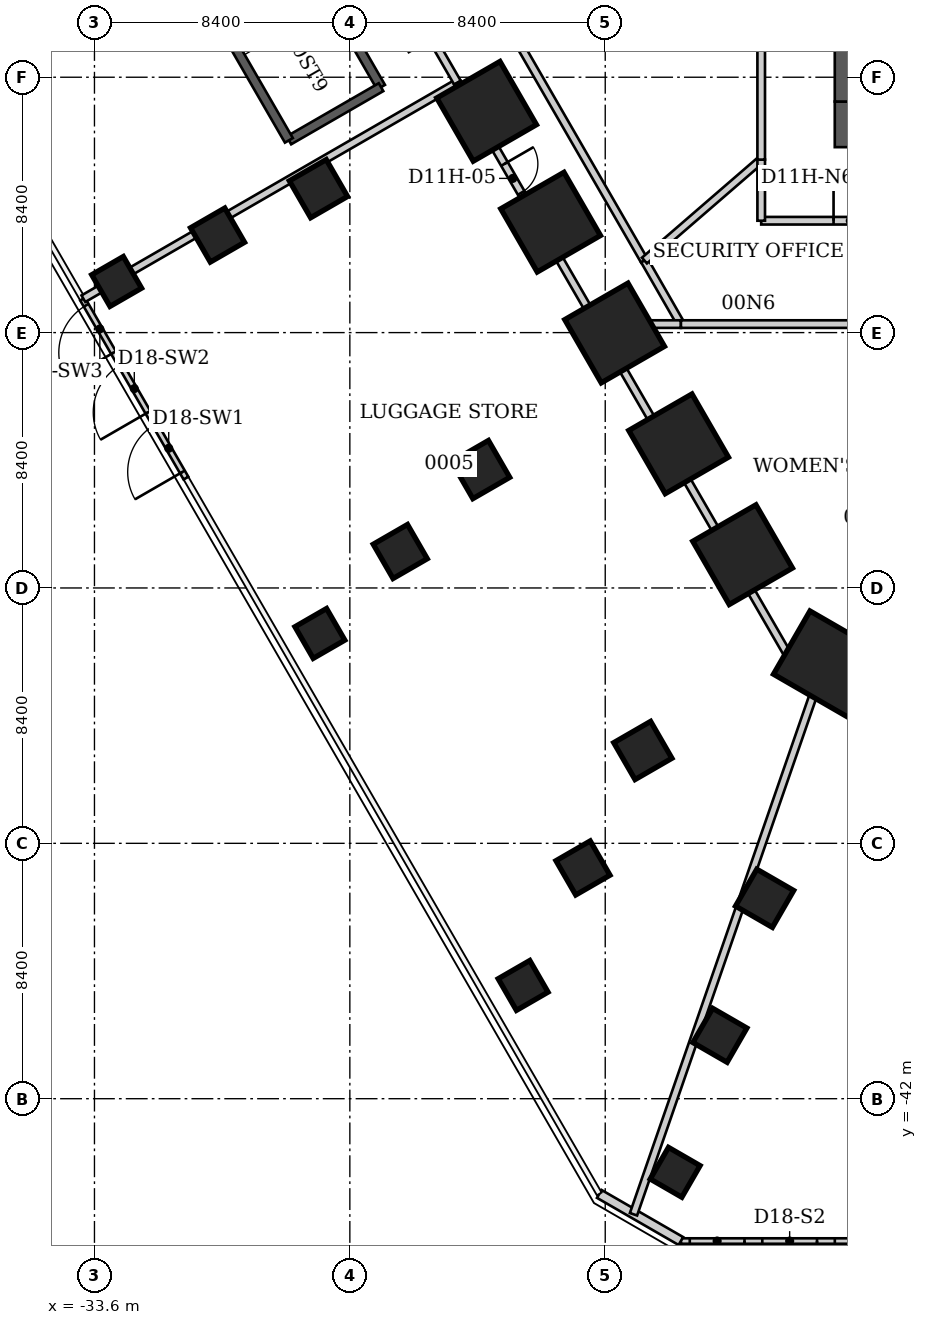
"""IFC4 building model, lengths in metres.
Left out: names, types, materials, properties, quantities, classifications, styles, units other than length and angle.
Written with IfcOpenShell. Run it as: python <this file> out.ifc"""

import sys

from ifc_helpers import new_model, si_unit, direction, frame, frame_2d, origin, origin_2d, place, context, subcontext, project, spatial, rectangle, extrude, element, fill, save


model = new_model("IFC4")
c1 = context("Model", 3, precision=1e-05, world=origin(), true_north=direction((0.0, 1.0)))
c2 = subcontext(c1, "Body", "Model", "MODEL_VIEW")
j1 = project(units=[si_unit("LENGTHUNIT", "METRE"), si_unit("PLANEANGLEUNIT", "RADIAN")], contexts=[c1])
p1 = place(None, origin())
s1 = spatial("IfcSite", under=j1, at=p1, CompositionType="ELEMENT")
p2 = place(p1, origin())
s2 = spatial("IfcBuilding", under=s1, at=p2, CompositionType="ELEMENT")
p3 = place(p2, origin())
s3 = spatial("IfcBuildingStorey", under=s2, at=p3, CompositionType="ELEMENT", Elevation=0.0)
p4 = place(p3, frame((-9.106, -27.897, -0.2), z_axis=(0.0, 0.0, 1.0), x_axis=(-0.5, -0.866025403784, 0.0)))
e1 = element("IfcColumn", 1, at=p4, inside=s3, PredefinedType="COLUMN", context=c2, shape_type="SweptSolid", body=[
    extrude(rectangle(XDim=2.4, YDim=3.6, at=origin_2d()), origin(), (0.0, 0.0, 1.0), 6.2),
])
for number, where, z_axis, x_axis in (
    (2, (-12.282, -24.105, -0.2), (0.0, 0.0, 1.0), (-0.866, -0.5, 0.0)),
    (3, (-14.387, -20.459, -0.2), (0.0, 0.0, 1.0), (-0.866, -0.5, 0.0)),
    (4, (-16.491, -16.813, -0.2), (0.0, 0.0, 1.0), (-0.866, -0.5, 0.0)),
    (5, (-18.596, -13.167, -0.2), (0.0, 0.0, 1.0), (-0.866, -0.5, 0.0)),
    (6, (-20.701, -9.521, -0.2), (0.0, 0.0, 1.0), (-0.866, -0.5, 0.0)),
):
    element("IfcColumn", number, at=place(p3, frame(where, z_axis=z_axis, x_axis=x_axis)), inside=s3, PredefinedType="COLUMN", context=c2, shape_type="SweptSolid", body=[
        extrude(rectangle(XDim=2.4, YDim=2.4, at=origin_2d()), origin(), (0.0, 0.0, 1.0), 6.2),
    ])
for number, where, z_axis, x_axis in (
    (7, (-11.558, -35.408, -0.2), (0.0, 0.0, 1.0), (-0.5, -0.866, 0.0)),
    (8, (-15.563, -30.546, -0.2), (0.0, 0.0, 1.0), (-0.866, -0.5, 0.0)),
    (9, (-20.898, -21.305, -0.2), (0.0, 0.0, 1.0), (-0.866, -0.5, 0.0)),
    (10, (-26.233, -12.065, -0.2), (0.0, 0.0, 1.0), (-0.866, -0.5, 0.0)),
):
    element("IfcColumn", number, at=place(p3, frame(where, z_axis=z_axis, x_axis=x_axis)), inside=s3, PredefinedType="COLUMN", context=c2, shape_type="SweptSolid", body=[
        extrude(rectangle(XDim=1.4, YDim=1.4, at=origin_2d()), origin(), (0.0, 0.0, 1.0), 6.2),
    ])
for number, where, z_axis, x_axis in (
    (11, (-13.029, -39.915, -0.2), (0.0, 0.0, 1.0), (-0.5, -0.866, 0.0)),
    (12, (-17.532, -34.41, -0.2), (0.0, 0.0, 1.0), (-0.866, -0.5, 0.0)),
    (13, (-23.542, -24.001, -0.2), (0.0, 0.0, 1.0), (-0.866, -0.5, 0.0)),
    (14, (-29.552, -13.592, -0.2), (0.0, 0.0, 1.0), (-0.866, -0.5, 0.0)),
):
    element("IfcColumn", number, at=place(p3, frame(where, z_axis=z_axis, x_axis=x_axis)), inside=s3, PredefinedType="COLUMN", context=c2, shape_type="SweptSolid", body=[
        extrude(rectangle(XDim=1.3, YDim=1.3, at=origin_2d()), origin(), (0.0, 0.0, 1.0), 6.2),
    ])
for number, where, z_axis, x_axis in (
    (15, (-14.5, -44.421, -0.2), (0.0, 0.0, 1.0), (-0.5, -0.866, 0.0)),
    (16, (-19.501, -38.274, -0.2), (0.0, 0.0, 1.0), (-0.866, -0.5, 0.0)),
    (17, (-26.186, -26.696, -0.2), (0.0, 0.0, 1.0), (-0.866, -0.5, 0.0)),
    (18, (-32.87, -15.118, -0.2), (0.0, 0.0, 1.0), (-0.866, -0.5, 0.0)),
):
    element("IfcColumn", number, at=place(p3, frame(where, z_axis=z_axis, x_axis=x_axis)), inside=s3, PredefinedType="COLUMN", context=c2, shape_type="SweptSolid", body=[
        extrude(rectangle(XDim=1.2, YDim=1.2, at=origin_2d()), origin(), (0.0, 0.0, 1.0), 6.2),
    ])
p5 = place(p3, frame((-9.25, -9.95, -0.2), z_axis=(0.0, 0.0, 1.0), x_axis=(1.0, 0.0, 0.0)))
e19 = element("IfcWall", 19, at=p5, inside=s3, PredefinedType="SHEAR", context=c2, shape_type="SweptSolid", body=[
    extrude(rectangle(XDim=18.5, YDim=1.5, at=frame_2d((9.25, 0.0))), origin(), (0.0, 0.0, 1.0), 6.2),
])
p6 = place(p5, frame((2.137, 0.0, 0.2)))
e20 = element("IfcOpeningElement", 20, at=p6, cuts=e19, PredefinedType="OPENING", context=c2, shape_type="SweptSolid", body=[
    extrude(rectangle(XDim=1.1, YDim=2.1, at=frame_2d((0.55, 1.05))), frame((0.0, 0.75, 0.0), z_axis=(0.0, -1.0, 0.0), x_axis=(1.0, 0.0, 0.0)), (0.0, 0.0, 1.0), 1.5),
])
p7 = place(p5, frame((4.762, 0.0, 0.2)))
e21 = element("IfcOpeningElement", 21, at=p7, cuts=e19, PredefinedType="OPENING", context=c2, shape_type="SweptSolid", body=[
    extrude(rectangle(XDim=1.1, YDim=2.1, at=frame_2d((0.55, 1.05))), frame((0.0, 0.75, 0.0), z_axis=(0.0, -1.0, 0.0), x_axis=(1.0, 0.0, 0.0)), (0.0, 0.0, 1.0), 1.5),
])
p8 = place(p5, frame((7.387, 0.0, 0.2)))
e22 = element("IfcOpeningElement", 22, at=p8, cuts=e19, PredefinedType="OPENING", context=c2, shape_type="SweptSolid", body=[
    extrude(rectangle(XDim=1.1, YDim=2.1, at=frame_2d((0.55, 1.05))), frame((0.0, 0.75, 0.0), z_axis=(0.0, -1.0, 0.0), x_axis=(1.0, 0.0, 0.0)), (0.0, 0.0, 1.0), 1.5),
])
p9 = place(p5, frame((10.012, 0.0, 0.2)))
e23 = element("IfcOpeningElement", 23, at=p9, cuts=e19, PredefinedType="OPENING", context=c2, shape_type="SweptSolid", body=[
    extrude(rectangle(XDim=1.1, YDim=2.1, at=frame_2d((0.55, 1.05))), frame((0.0, 0.75, 0.0), z_axis=(0.0, -1.0, 0.0), x_axis=(1.0, 0.0, 0.0)), (0.0, 0.0, 1.0), 1.5),
])
p10 = place(p5, frame((12.637, 0.0, 0.2)))
e24 = element("IfcOpeningElement", 24, at=p10, cuts=e19, PredefinedType="OPENING", context=c2, shape_type="SweptSolid", body=[
    extrude(rectangle(XDim=1.1, YDim=2.1, at=frame_2d((0.55, 1.05))), frame((0.0, 0.75, 0.0), z_axis=(0.0, -1.0, 0.0), x_axis=(1.0, 0.0, 0.0)), (0.0, 0.0, 1.0), 1.5),
])
p11 = place(p5, frame((15.262, 0.0, 0.2)))
e25 = element("IfcOpeningElement", 25, at=p11, cuts=e19, PredefinedType="OPENING", context=c2, shape_type="SweptSolid", body=[
    extrude(rectangle(XDim=1.1, YDim=2.1, at=frame_2d((0.55, 1.05))), frame((0.0, 0.75, 0.0), z_axis=(0.0, -1.0, 0.0), x_axis=(1.0, 0.0, 0.0)), (0.0, 0.0, 1.0), 1.5),
])
p12 = place(p3, frame((-8.5, -9.2, -0.2), z_axis=(0.0, 0.0, 1.0), x_axis=(0.0, 1.0, 0.0)))
e26 = element("IfcWall", 26, at=p12, inside=s3, PredefinedType="SHEAR", context=c2, shape_type="SweptSolid", body=[
    extrude(rectangle(XDim=15.3, YDim=1.5, at=frame_2d((7.65, 0.0))), origin(), (0.0, 0.0, 1.0), 6.2),
])
p13 = place(p12, frame((10.7, 0.0, 0.2)))
e27 = element("IfcOpeningElement", 27, at=p13, cuts=e26, PredefinedType="OPENING", context=c2, shape_type="SweptSolid", body=[
    extrude(rectangle(XDim=1.2, YDim=2.2, at=frame_2d((0.6, 1.1))), frame((0.0, 0.75, 0.0), z_axis=(0.0, -1.0, 0.0), x_axis=(1.0, 0.0, 0.0)), (0.0, 0.0, 1.0), 1.5),
])
p14 = place(p3, frame((-7.156, -46.682, 0.0), z_axis=(0.0, 0.0, 1.0), x_axis=(-1.0, 0.0, 0.0)))
e28 = element("IfcWall", 28, at=p14, inside=s3, PredefinedType="SOLIDWALL", context=c2, shape_type="SweptSolid", body=[
    extrude(rectangle(XDim=7.156, YDim=0.18, at=frame_2d((3.578, 0.0))), origin(), (0.0, 0.0, 1.0), 5.84),
])
p15 = place(p14, frame((0.293, 0.0, 0.0)))
e29 = element("IfcOpeningElement", 29, at=p15, cuts=e28, PredefinedType="OPENING", context=c2, shape_type="SweptSolid", body=[
    extrude(rectangle(XDim=1.8, YDim=2.7, at=frame_2d((0.9, 1.35))), frame((0.0, 0.09, 0.0), z_axis=(0.0, -1.0, 0.0), x_axis=(1.0, 0.0, 0.0)), (0.0, 0.0, 1.0), 0.18),
])
p16 = place(p14, frame((2.678, 0.0, 0.0)))
e30 = element("IfcOpeningElement", 30, at=p16, cuts=e28, PredefinedType="OPENING", context=c2, shape_type="SweptSolid", body=[
    extrude(rectangle(XDim=1.8, YDim=2.7, at=frame_2d((0.9, 1.35))), frame((0.0, 0.09, 0.0), z_axis=(0.0, -1.0, 0.0), x_axis=(1.0, 0.0, 0.0)), (0.0, 0.0, 1.0), 0.18),
])
p17 = place(p14, frame((5.063, 0.0, 0.0)))
e31 = element("IfcOpeningElement", 31, at=p17, cuts=e28, PredefinedType="OPENING", context=c2, shape_type="SweptSolid", body=[
    extrude(rectangle(XDim=1.8, YDim=2.7, at=frame_2d((0.9, 1.35))), frame((0.0, 0.09, 0.0), z_axis=(0.0, -1.0, 0.0), x_axis=(1.0, 0.0, 0.0)), (0.0, 0.0, 1.0), 0.18),
])
p18 = place(p3, frame((-14.312, -46.682, 0.0), z_axis=(0.0, 0.0, 1.0), x_axis=(-0.86600983753, 0.500026960575, 0.0)))
e32 = element("IfcWall", 32, at=p18, inside=s3, PredefinedType="SOLIDWALL", context=c2, shape_type="SweptSolid", body=[
    extrude(rectangle(XDim=3.1, YDim=0.3, at=frame_2d((1.55, 0.0))), origin(), (0.0, 0.0, 1.0), 5.84),
])
p19 = place(p3, frame((-30.591, -21.586, 0.0), z_axis=(0.0, 0.0, 1.0), x_axis=(-0.500013675503, 0.866017508085, 0.0)))
e33 = element("IfcWall", 33, at=p19, inside=s3, PredefinedType="SOLIDWALL", context=c2, shape_type="SweptSolid", body=[
    extrude(rectangle(XDim=6.797, YDim=0.18, at=frame_2d((3.398, 0.0))), origin(), (0.0, 0.0, 1.0), 5.84),
])
p20 = place(p19, frame((0.233, 0.0, 0.0)))
e34 = element("IfcOpeningElement", 34, at=p20, cuts=e33, PredefinedType="OPENING", context=c2, shape_type="SweptSolid", body=[
    extrude(rectangle(XDim=1.8, YDim=2.7, at=frame_2d((0.9, 1.35))), frame((0.0, 0.09, 0.0), z_axis=(0.0, -1.0, 0.0), x_axis=(1.0, 0.0, 0.0)), (0.0, 0.0, 1.0), 0.18),
])
p21 = place(p19, frame((2.499, 0.0, 0.0)))
e35 = element("IfcOpeningElement", 35, at=p21, cuts=e33, PredefinedType="OPENING", context=c2, shape_type="SweptSolid", body=[
    extrude(rectangle(XDim=1.8, YDim=2.7, at=frame_2d((0.9, 1.35))), frame((0.0, 0.09, 0.0), z_axis=(0.0, -1.0, 0.0), x_axis=(1.0, 0.0, 0.0)), (0.0, 0.0, 1.0), 0.18),
])
p22 = place(p19, frame((4.764, 0.0, 0.0)))
e36 = element("IfcOpeningElement", 36, at=p22, cuts=e33, PredefinedType="OPENING", context=c2, shape_type="SweptSolid", body=[
    extrude(rectangle(XDim=1.8, YDim=2.7, at=frame_2d((0.9, 1.35))), frame((0.0, 0.09, 0.0), z_axis=(0.0, -1.0, 0.0), x_axis=(1.0, 0.0, 0.0)), (0.0, 0.0, 1.0), 0.18),
])
p23 = place(p3, frame((-33.964, -15.685, 0.0), z_axis=(0.0, 0.0, 1.0), x_axis=(0.865990423019, 0.500060583569, 0.0)))
e37 = element("IfcWall", 37, at=p23, inside=s3, PredefinedType="PARTITIONING", context=c2, shape_type="SweptSolid", body=[
    extrude(rectangle(XDim=14.208, YDim=0.25, at=frame_2d((7.104, 0.0))), origin(), (0.0, 0.0, 1.0), 4.993),
])
p24 = place(p3, frame((-29.54, 5.06, 0.0), z_axis=(0.0, 0.0, 1.0), x_axis=(0.500237574973, -0.865888196354, 0.0)))
e38 = element("IfcWall", 38, at=p24, inside=s3, PredefinedType="PARTITIONING", context=c2, shape_type="SweptSolid", body=[
    extrude(rectangle(XDim=15.753, YDim=0.25, at=frame_2d((7.876, 0.0))), origin(), (0.0, 0.0, 1.0), 4.04),
])
p25 = place(p24, frame((5.726, 0.0, 0.0)))
e39 = element("IfcOpeningElement", 39, at=p25, cuts=e38, PredefinedType="OPENING", context=c2, shape_type="SweptSolid", body=[
    extrude(rectangle(XDim=1.6, YDim=2.4, at=frame_2d((0.8, 1.2))), frame((0.0, 0.125, 0.0), z_axis=(0.0, -1.0, 0.0), x_axis=(1.0, 0.0, 0.0)), (0.0, 0.0, 1.0), 0.25),
])
p26 = place(p3, frame((-27.14, 5.71, 0.0), z_axis=(0.0, 0.0, 1.0), x_axis=(0.499871788402, -0.866099414132, 0.0)))
e40 = element("IfcWall", 40, at=p26, inside=s3, PredefinedType="PARTITIONING", context=c2, shape_type="SweptSolid", body=[
    extrude(rectangle(XDim=23.257, YDim=0.25, at=frame_2d((11.628, 0.0))), origin(), (0.0, 0.0, 1.0), 5.84),
])
p27 = place(p26, frame((9.979, 0.0, 0.0)))
e41 = element("IfcOpeningElement", 41, at=p27, cuts=e40, PredefinedType="OPENING", context=c2, shape_type="SweptSolid", body=[
    extrude(rectangle(XDim=1.6, YDim=2.4, at=frame_2d((0.8, 1.2))), frame((0.0, 0.125, 0.0), z_axis=(0.0, -1.0, 0.0), x_axis=(1.0, 0.0, 0.0)), (0.0, 0.0, 1.0), 0.25),
])
p28 = place(p3, frame((-21.66, -8.58, 0.0), z_axis=(0.0, 0.0, 1.0), x_axis=(0.50046740921, -0.865755376719, 0.0)))
e42 = element("IfcWall", 42, at=p28, inside=s3, PredefinedType="PARTITIONING", context=c2, shape_type="SweptSolid", body=[
    extrude(rectangle(XDim=9.171, YDim=0.25, at=frame_2d((4.585, 0.0))), origin(), (0.0, 0.0, 1.0), 4.04),
])
p29 = place(p28, frame((3.086, 0.0, 0.0)))
e43 = element("IfcOpeningElement", 43, at=p29, cuts=e42, PredefinedType="OPENING", context=c2, shape_type="SweptSolid", body=[
    extrude(rectangle(XDim=1.1, YDim=2.2, at=frame_2d((0.55, 1.1))), frame((0.0, 0.125, 0.0), z_axis=(0.0, -1.0, 0.0), x_axis=(1.0, 0.0, 0.0)), (0.0, 0.0, 1.0), 0.25),
])
p30 = place(p3, frame((-17.08, -16.52, 0.0), z_axis=(0.0, 0.0, 1.0), x_axis=(0.500484795969, -0.865745325719, 0.0)))
e44 = element("IfcWall", 44, at=p30, inside=s3, PredefinedType="PARTITIONING", context=c2, shape_type="SweptSolid", body=[
    extrude(rectangle(XDim=13.387, YDim=0.25, at=frame_2d((6.694, 0.0))), origin(), (0.0, 0.0, 1.0), 4.04),
])
p31 = place(p3, frame((-15.87, -45.802, 0.0), z_axis=(0.0, 0.0, 1.0), x_axis=(0.327267371913, 0.944931779168, 0.0)))
e45 = element("IfcWall", 45, at=p31, inside=s3, PredefinedType="PARTITIONING", context=c2, shape_type="SweptSolid", body=[
    extrude(rectangle(XDim=18.395, YDim=0.25, at=frame_2d((9.197, 0.0))), origin(), (0.0, 0.0, 1.0), 5.75),
])
p32 = place(p3, frame((-15.51, -14.43, 0.0), z_axis=(0.0, 0.0, 1.0), x_axis=(0.497894326365, -0.867237706614, 0.0)))
e46 = element("IfcWall", 46, at=p32, inside=s3, PredefinedType="PARTITIONING", context=c2, shape_type="SweptSolid", body=[
    extrude(rectangle(XDim=2.41, YDim=0.25, at=frame_2d((1.205, 0.0))), origin(), (0.0, 0.0, 1.0), 5.84),
])
p33 = place(p3, frame((-14.31, -16.52, 0.0), z_axis=(0.0, 0.0, 1.0), x_axis=(-1.0, 0.0, 0.0)))
e47 = element("IfcWall", 47, at=p33, inside=s3, PredefinedType="PARTITIONING", context=c2, shape_type="SweptSolid", body=[
    extrude(rectangle(XDim=2.76, YDim=0.25, at=frame_2d((1.38, 0.0))), origin(), (0.0, 0.0, 1.0), 5.84),
])
p34 = place(p3, frame((-11.67, -13.12, 0.0), z_axis=(0.0, 0.0, 1.0), x_axis=(1.0, 0.0, 0.0)))
e48 = element("IfcWall", 48, at=p34, inside=s3, PredefinedType="PARTITIONING", context=c2, shape_type="SweptSolid", body=[
    extrude(rectangle(XDim=5.86, YDim=0.25, at=frame_2d((2.93, 0.0))), origin(), (0.0, 0.0, 1.0), 5.84),
])
p35 = place(p34, frame((2.38, 0.0, 0.0)))
e49 = element("IfcOpeningElement", 49, at=p35, cuts=e48, PredefinedType="OPENING", context=c2, shape_type="SweptSolid", body=[
    extrude(rectangle(XDim=1.1, YDim=2.2, at=frame_2d((0.55, 1.1))), frame((0.0, 0.125, 0.0), z_axis=(0.0, -1.0, 0.0), x_axis=(1.0, 0.0, 0.0)), (0.0, 0.0, 1.0), 0.25),
])
p36 = place(p3, frame((-11.67, -11.11, 0.0), z_axis=(0.0, 0.0, 1.0), x_axis=(-0.756493073491, -0.654001704707, 0.0)))
e50 = element("IfcWall", 50, at=p36, inside=s3, PredefinedType="PARTITIONING", context=c2, shape_type="SweptSolid", body=[
    extrude(rectangle(XDim=5.076, YDim=0.25, at=frame_2d((2.538, 0.0))), origin(), (0.0, 0.0, 1.0), 5.238),
])
p37 = place(p3, frame((-11.67, -11.11, 0.0), z_axis=(0.0, 0.0, 1.0), x_axis=(0.0, -1.0, 0.0)))
e51 = element("IfcWall", 51, at=p37, inside=s3, PredefinedType="PARTITIONING", context=c2, shape_type="SweptSolid", body=[
    extrude(rectangle(XDim=2.01, YDim=0.25, at=frame_2d((1.005, 0.0))), origin(), (0.0, 0.0, 1.0), 5.84),
])
p38 = place(p3, frame((-11.67, 10.02, 0.0), z_axis=(0.0, 0.0, 1.0), x_axis=(0.0, -1.0, 0.0)))
e52 = element("IfcWall", 52, at=p38, inside=s3, PredefinedType="PARTITIONING", context=c2, shape_type="SweptSolid", body=[
    extrude(rectangle(XDim=21.13, YDim=0.25, at=frame_2d((10.565, 0.0))), origin(), (0.0, 0.0, 1.0), 5.84),
])
p39 = place(p3, frame((-10.38, -28.11, 0.0), z_axis=(0.0, 0.0, 1.0), x_axis=(0.865714845822, -0.5005375168, 0.0)))
e53 = element("IfcWall", 53, at=p39, inside=s3, PredefinedType="PARTITIONING", context=c2, shape_type="SweptSolid", body=[
    extrude(rectangle(XDim=0.579, YDim=0.25, at=frame_2d((0.29, 0.0))), origin(), (0.0, 0.0, 1.0), 5.84),
])
p40 = place(p3, frame((-8.65, -29.11, 0.0), z_axis=(0.0, 0.0, 1.0), x_axis=(-0.866883441829, 0.498510880807, 0.0)))
e54 = element("IfcWall", 54, at=p40, inside=s3, PredefinedType="PARTITIONING", context=c2, shape_type="SweptSolid", body=[
    extrude(rectangle(XDim=1.385, YDim=0.25, at=frame_2d((0.692, 0.0))), origin(), (0.0, 0.0, 1.0), 5.84),
])
p41 = place(p3, frame((-6.99, -16.52, 0.0), z_axis=(0.0, 0.0, 1.0), x_axis=(-1.0, 0.0, 0.0)))
e55 = element("IfcWall", 55, at=p41, inside=s3, PredefinedType="PARTITIONING", context=c2, shape_type="SweptSolid", body=[
    extrude(rectangle(XDim=7.32, YDim=0.25, at=frame_2d((3.66, 0.0))), origin(), (0.0, 0.0, 1.0), 5.84),
])
p42 = place(p3, frame((-28.824, -0.672, 0.0), z_axis=(0.0, 0.0, 1.0), x_axis=(0.499984536904, -0.866034331223, 0.0)))
e56 = element("IfcWall", 56, at=p42, inside=s3, PredefinedType="SHEAR", context=c2, shape_type="SweptSolid", body=[
    extrude(rectangle(XDim=9.3, YDim=0.3, at=frame_2d((4.65, 0.0))), origin(), (0.0, 0.0, 1.0), 6.0),
])
p43 = place(p3, frame((-24.174, -8.727, 0.0), z_axis=(0.0, 0.0, 1.0), x_axis=(-0.866019471182, -0.500010275428, 0.0)))
e57 = element("IfcWall", 57, at=p43, inside=s3, PredefinedType="SHEAR", context=c2, shape_type="SweptSolid", body=[
    extrude(rectangle(XDim=3.5, YDim=0.3, at=frame_2d((1.75, 0.0))), origin(), (0.0, 0.0, 1.0), 6.0),
])
p44 = place(p3, frame((-27.205, -10.477, 0.0), z_axis=(0.0, 0.0, 1.0), x_axis=(-0.499984536904, 0.866034331223, 0.0)))
e58 = element("IfcWall", 58, at=p44, inside=s3, PredefinedType="SHEAR", context=c2, shape_type="SweptSolid", body=[
    extrude(rectangle(XDim=9.3, YDim=0.3, at=frame_2d((4.65, 0.0))), origin(), (0.0, 0.0, 1.0), 6.0),
])
p45 = place(p15, origin())
e59 = element("IfcDoor", 59, at=p45, inside=s3, OperationType="SINGLE_SWING_LEFT", PredefinedType="DOOR", context=c2, shape_type="SweptSolid", body=[
    extrude(rectangle(XDim=1.8, YDim=2.7, at=frame_2d((0.9, 1.35))), frame((0.0, 0.025, 0.0), z_axis=(0.0, -1.0, 0.0), x_axis=(1.0, 0.0, 0.0)), (0.0, 0.0, 1.0), 0.05),
])
fill(e29, e59)
p46 = place(p16, origin())
e60 = element("IfcDoor", 60, at=p46, inside=s3, OperationType="SINGLE_SWING_LEFT", PredefinedType="DOOR", context=c2, shape_type="SweptSolid", body=[
    extrude(rectangle(XDim=1.8, YDim=2.7, at=frame_2d((0.9, 1.35))), frame((0.0, 0.025, 0.0), z_axis=(0.0, -1.0, 0.0), x_axis=(1.0, 0.0, 0.0)), (0.0, 0.0, 1.0), 0.05),
])
fill(e30, e60)
p47 = place(p17, origin())
e61 = element("IfcDoor", 61, at=p47, inside=s3, OperationType="SINGLE_SWING_LEFT", PredefinedType="DOOR", context=c2, shape_type="SweptSolid", body=[
    extrude(rectangle(XDim=1.8, YDim=2.7, at=frame_2d((0.9, 1.35))), frame((0.0, 0.025, 0.0), z_axis=(0.0, -1.0, 0.0), x_axis=(1.0, 0.0, 0.0)), (0.0, 0.0, 1.0), 0.05),
])
fill(e31, e61)
p48 = place(p20, origin())
e62 = element("IfcDoor", 62, at=p48, inside=s3, OperationType="SINGLE_SWING_LEFT", PredefinedType="DOOR", context=c2, shape_type="SweptSolid", body=[
    extrude(rectangle(XDim=1.8, YDim=2.7, at=frame_2d((0.9, 1.35))), frame((0.0, 0.025, 0.0), z_axis=(0.0, -1.0, 0.0), x_axis=(1.0, 0.0, 0.0)), (0.0, 0.0, 1.0), 0.05),
])
fill(e34, e62)
p49 = place(p21, origin())
e63 = element("IfcDoor", 63, at=p49, inside=s3, OperationType="SINGLE_SWING_LEFT", PredefinedType="DOOR", context=c2, shape_type="SweptSolid", body=[
    extrude(rectangle(XDim=1.8, YDim=2.7, at=frame_2d((0.9, 1.35))), frame((0.0, 0.025, 0.0), z_axis=(0.0, -1.0, 0.0), x_axis=(1.0, 0.0, 0.0)), (0.0, 0.0, 1.0), 0.05),
])
fill(e35, e63)
p50 = place(p22, origin())
e64 = element("IfcDoor", 64, at=p50, inside=s3, OperationType="SINGLE_SWING_LEFT", PredefinedType="DOOR", context=c2, shape_type="SweptSolid", body=[
    extrude(rectangle(XDim=1.8, YDim=2.7, at=frame_2d((0.9, 1.35))), frame((0.0, 0.025, 0.0), z_axis=(0.0, -1.0, 0.0), x_axis=(1.0, 0.0, 0.0)), (0.0, 0.0, 1.0), 0.05),
])
fill(e36, e64)
p51 = place(p29, origin())
e65 = element("IfcDoor", 65, at=p51, inside=s3, OperationType="SINGLE_SWING_LEFT", PredefinedType="DOOR", context=c2, shape_type="SweptSolid", body=[
    extrude(rectangle(XDim=1.1, YDim=2.2, at=frame_2d((0.55, 1.1))), frame((0.0, 0.025, 0.0), z_axis=(0.0, -1.0, 0.0), x_axis=(1.0, 0.0, 0.0)), (0.0, 0.0, 1.0), 0.05),
])
fill(e43, e65)
p52 = place(p35, origin())
e66 = element("IfcDoor", 66, at=p52, inside=s3, OperationType="SINGLE_SWING_LEFT", PredefinedType="DOOR", context=c2, shape_type="SweptSolid", body=[
    extrude(rectangle(XDim=1.1, YDim=2.2, at=frame_2d((0.55, 1.1))), frame((0.0, 0.025, 0.0), z_axis=(0.0, -1.0, 0.0), x_axis=(1.0, 0.0, 0.0)), (0.0, 0.0, 1.0), 0.05),
])
fill(e49, e66)
save(model, sys.argv[1])
